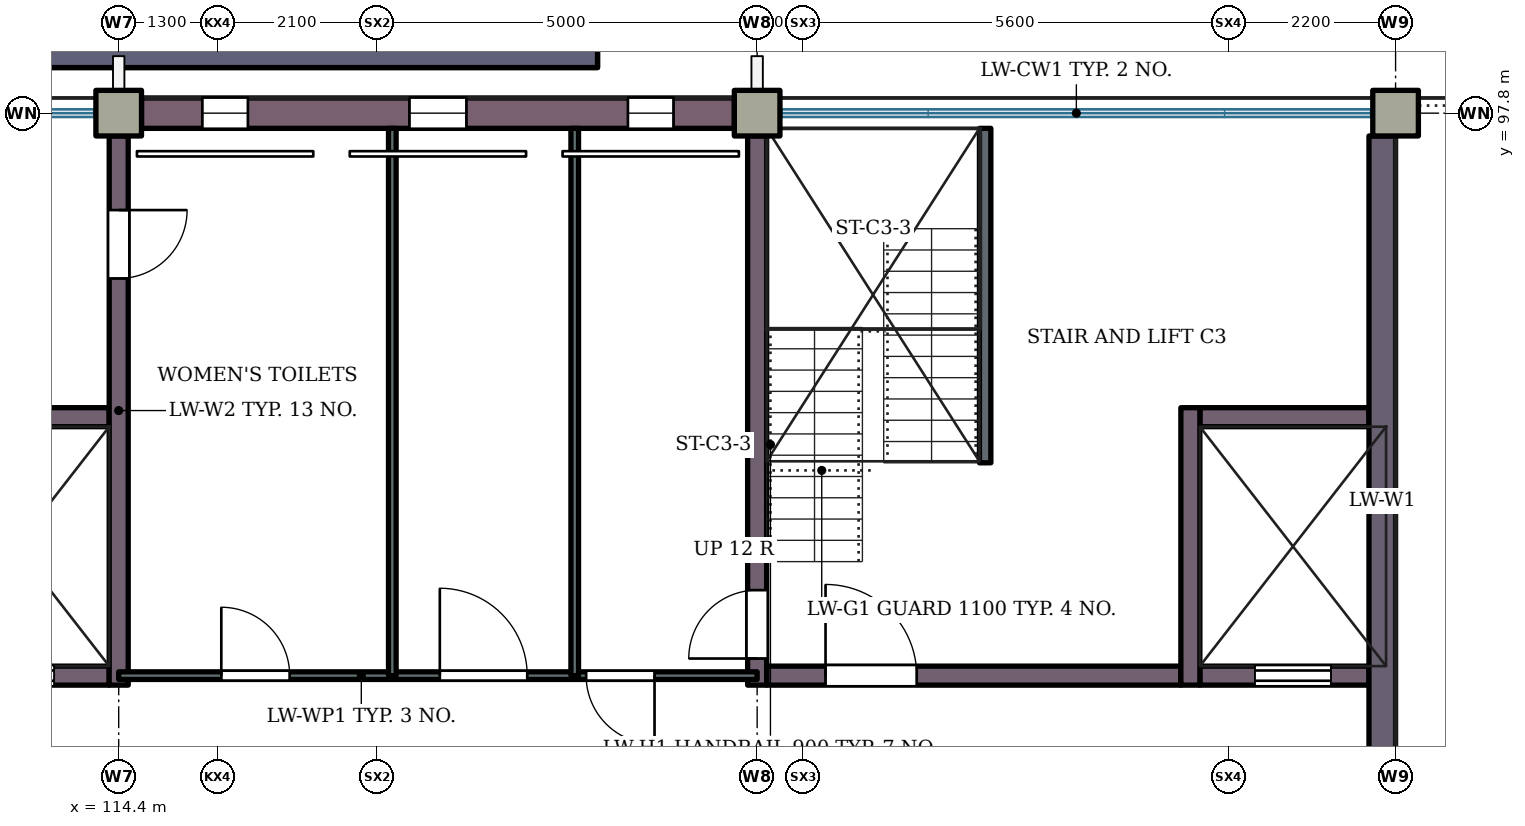
"""IFC4 building model, lengths in metres.
Left out: names, types, materials, properties, quantities, classifications, styles, units other than length and angle.
Written with IfcOpenShell. Run it as: python <this file> out.ifc"""

import sys

from ifc_helpers import new_model, si_unit, direction, frame, frame_2d, origin, origin_2d, place, context, subcontext, project, spatial, rectangle, extrude, element, fill, save


model = new_model("IFC4")
c1 = context("Model", 3, precision=1e-05, world=origin(), true_north=direction((0.0, 1.0)))
c2 = subcontext(c1, "Body", "Model", "MODEL_VIEW")
j1 = project(units=[si_unit("LENGTHUNIT", "METRE"), si_unit("PLANEANGLEUNIT", "RADIAN")], contexts=[c1])
p1 = place(None, origin())
s1 = spatial("IfcSite", under=j1, at=p1, CompositionType="ELEMENT")
p2 = place(p1, origin())
s2 = spatial("IfcBuilding", under=s1, at=p2, CompositionType="ELEMENT")
p3 = place(p2, frame((0.0, 0.0, 12.6)))
s3 = spatial("IfcBuildingStorey", under=s2, at=p3, CompositionType="ELEMENT", Elevation=12.6)
for number, where, z_axis, x_axis in (
    (1, (114.4, 97.8, 0.0), (0.0, 0.0, 1.0), (1.0, 0.0, 0.0)),
    (2, (122.8, 97.8, 0.0), (0.0, 0.0, 1.0), (1.0, 0.0, 0.0)),
    (3, (131.2, 97.8, 0.0), (0.0, 0.0, 1.0), (1.0, 0.0, 0.0)),
):
    element("IfcColumn", number, at=place(p3, frame(where, z_axis=z_axis, x_axis=x_axis)), inside=s3, PredefinedType="COLUMN", context=c2, shape_type="SweptSolid", body=[
        extrude(rectangle(XDim=0.6, YDim=0.6, at=origin_2d()), origin(), (0.0, 0.0, 1.0), 4.2),
    ])
p4 = place(p3, frame((111.825, 90.4, 0.0), z_axis=(0.0, 0.0, 1.0), x_axis=(1.0, 0.0, 0.0)))
e4 = element("IfcWall", 4, at=p4, inside=s3, PredefinedType="SHEAR", context=c2, shape_type="SweptSolid", body=[
    extrude(rectangle(XDim=2.45, YDim=0.25, at=frame_2d((1.225, 0.0))), origin(), (0.0, 0.0, 1.0), 4.2),
])
p5 = place(p4, frame((0.725, 0.0, 0.0)))
e5 = element("IfcOpeningElement", 5, at=p5, cuts=e4, PredefinedType="OPENING", context=c2, shape_type="SweptSolid", body=[
    extrude(rectangle(XDim=1.0, YDim=2.1, at=frame_2d((0.5, 1.05))), frame((0.0, 0.135, 0.0), z_axis=(0.0, -1.0, 0.0), x_axis=(1.0, 0.0, 0.0)), (0.0, 0.0, 1.0), 0.27),
])
p6 = place(p3, frame((122.925, 90.4, 0.0), z_axis=(0.0, 0.0, 1.0), x_axis=(1.0, 0.0, 0.0)))
e6 = element("IfcWall", 6, at=p6, inside=s3, PredefinedType="SHEAR", context=c2, shape_type="SweptSolid", body=[
    extrude(rectangle(XDim=5.45, YDim=0.25, at=frame_2d((2.725, 0.0))), origin(), (0.0, 0.0, 1.0), 4.2),
])
p7 = place(p6, frame((0.775, 0.0, 0.0)))
e7 = element("IfcOpeningElement", 7, at=p7, cuts=e6, PredefinedType="OPENING", context=c2, shape_type="SweptSolid", body=[
    extrude(rectangle(XDim=1.2, YDim=2.1, at=frame_2d((0.6, 1.05))), frame((0.0, 0.135, 0.0), z_axis=(0.0, -1.0, 0.0), x_axis=(1.0, 0.0, 0.0)), (0.0, 0.0, 1.0), 0.27),
])
p8 = place(p3, frame((128.625, 90.4, 0.0), z_axis=(0.0, 0.0, 1.0), x_axis=(1.0, 0.0, 0.0)))
e8 = element("IfcWall", 8, at=p8, inside=s3, PredefinedType="SHEAR", context=c2, shape_type="SweptSolid", body=[
    extrude(rectangle(XDim=2.225, YDim=0.25, at=frame_2d((1.113, 0.0))), origin(), (0.0, 0.0, 1.0), 4.2),
])
p9 = place(p8, frame((0.725, 0.0, 0.0)))
e9 = element("IfcOpeningElement", 9, at=p9, cuts=e8, PredefinedType="OPENING", context=c2, shape_type="SweptSolid", body=[
    extrude(rectangle(XDim=1.0, YDim=2.1, at=frame_2d((0.5, 1.05))), frame((0.0, 0.135, 0.0), z_axis=(0.0, -1.0, 0.0), x_axis=(1.0, 0.0, 0.0)), (0.0, 0.0, 1.0), 0.27),
])
p10 = place(p3, frame((111.825, 93.8, 0.0), z_axis=(0.0, 0.0, 1.0), x_axis=(1.0, 0.0, 0.0)))
e10 = element("IfcWall", 10, at=p10, inside=s3, PredefinedType="SHEAR", context=c2, shape_type="SweptSolid", body=[
    extrude(rectangle(XDim=2.45, YDim=0.25, at=frame_2d((1.225, 0.0))), origin(), (0.0, 0.0, 1.0), 4.2),
])
p11 = place(p3, frame((128.625, 93.8, 0.0), z_axis=(0.0, 0.0, 1.0), x_axis=(1.0, 0.0, 0.0)))
e11 = element("IfcWall", 11, at=p11, inside=s3, PredefinedType="SHEAR", context=c2, shape_type="SweptSolid", body=[
    extrude(rectangle(XDim=2.225, YDim=0.25, at=frame_2d((1.113, 0.0))), origin(), (0.0, 0.0, 1.0), 4.2),
])
p12 = place(p3, frame((114.4, 90.275, 0.0), z_axis=(0.0, 0.0, 1.0), x_axis=(0.0, 1.0, 0.0)))
e12 = element("IfcWall", 12, at=p12, inside=s3, PredefinedType="SHEAR", context=c2, shape_type="SweptSolid", body=[
    extrude(rectangle(XDim=7.225, YDim=0.25, at=frame_2d((3.613, 0.0))), origin(), (0.0, 0.0, 1.0), 4.2),
])
p13 = place(p12, frame((5.35, 0.0, 0.0)))
e13 = element("IfcOpeningElement", 13, at=p13, cuts=e12, PredefinedType="OPENING", context=c2, shape_type="SweptSolid", body=[
    extrude(rectangle(XDim=0.9, YDim=2.1, at=frame_2d((0.45, 1.05))), frame((0.0, 0.135, 0.0), z_axis=(0.0, -1.0, 0.0), x_axis=(1.0, 0.0, 0.0)), (0.0, 0.0, 1.0), 0.27),
])
p14 = place(p3, frame((122.8, 90.275, 0.0), z_axis=(0.0, 0.0, 1.0), x_axis=(0.0, 1.0, 0.0)))
e14 = element("IfcWall", 14, at=p14, inside=s3, PredefinedType="SHEAR", context=c2, shape_type="SweptSolid", body=[
    extrude(rectangle(XDim=7.225, YDim=0.25, at=frame_2d((3.613, 0.0))), origin(), (0.0, 0.0, 1.0), 4.2),
])
p15 = place(p14, frame((0.35, 0.0, 0.0)))
e15 = element("IfcOpeningElement", 15, at=p15, cuts=e14, PredefinedType="OPENING", context=c2, shape_type="SweptSolid", body=[
    extrude(rectangle(XDim=0.9, YDim=2.1, at=frame_2d((0.45, 1.05))), frame((0.0, 0.135, 0.0), z_axis=(0.0, -1.0, 0.0), x_axis=(1.0, 0.0, 0.0)), (0.0, 0.0, 1.0), 0.27),
])
p16 = place(p3, frame((128.5, 90.275, 0.0), z_axis=(0.0, 0.0, 1.0), x_axis=(0.0, 1.0, 0.0)))
e16 = element("IfcWall", 16, at=p16, inside=s3, PredefinedType="SHEAR", context=c2, shape_type="SweptSolid", body=[
    extrude(rectangle(XDim=3.65, YDim=0.25, at=frame_2d((1.825, 0.0))), origin(), (0.0, 0.0, 1.0), 4.2),
])
p17 = place(p3, frame((131.025, 97.5, 0.0), z_axis=(0.0, 0.0, 1.0), x_axis=(0.0, -1.0, 0.0)))
e17 = element("IfcWall", 17, at=p17, inside=s3, PredefinedType="SHEAR", context=c2, shape_type="SweptSolid", body=[
    extrude(rectangle(XDim=9.6, YDim=0.35, at=frame_2d((4.8, 0.0))), origin(), (0.0, 0.0, 1.0), 4.2),
])
p18 = place(p3, frame((114.7, 97.8, 0.0), z_axis=(0.0, 0.0, 1.0), x_axis=(1.0, 0.0, 0.0)))
e18 = element("IfcWall", 18, at=p18, inside=s3, PredefinedType="SOLIDWALL", context=c2, shape_type="SweptSolid", body=[
    extrude(rectangle(XDim=7.8, YDim=0.4, at=frame_2d((3.9, 0.0))), origin(), (0.0, 0.0, 1.0), 3.32),
])
p19 = place(p18, frame((0.8, 0.0, 2.1)))
e19 = element("IfcOpeningElement", 19, at=p19, cuts=e18, PredefinedType="OPENING", context=c2, shape_type="SweptSolid", body=[
    extrude(rectangle(XDim=0.6, YDim=0.9, at=frame_2d((0.3, 0.45))), frame((0.0, 0.21, 0.0), z_axis=(0.0, -1.0, 0.0), x_axis=(1.0, 0.0, 0.0)), (0.0, 0.0, 1.0), 0.42),
])
p20 = place(p18, frame((3.525, 0.0, 2.1)))
e20 = element("IfcOpeningElement", 20, at=p20, cuts=e18, PredefinedType="OPENING", context=c2, shape_type="SweptSolid", body=[
    extrude(rectangle(XDim=0.75, YDim=0.9, at=frame_2d((0.375, 0.45))), frame((0.0, 0.21, 0.0), z_axis=(0.0, -1.0, 0.0), x_axis=(1.0, 0.0, 0.0)), (0.0, 0.0, 1.0), 0.42),
])
p21 = place(p18, frame((6.4, 0.0, 2.1)))
e21 = element("IfcOpeningElement", 21, at=p21, cuts=e18, PredefinedType="OPENING", context=c2, shape_type="SweptSolid", body=[
    extrude(rectangle(XDim=0.6, YDim=0.9, at=frame_2d((0.3, 0.45))), frame((0.0, 0.21, 0.0), z_axis=(0.0, -1.0, 0.0), x_axis=(1.0, 0.0, 0.0)), (0.0, 0.0, 1.0), 0.42),
])
p22 = place(p3, frame((108.1, 98.9, 0.0), z_axis=(0.0, 0.0, 1.0), x_axis=(1.0, 0.0, 0.0)))
e22 = element("IfcWall", 22, at=p22, inside=s3, PredefinedType="STANDARD", context=c2, shape_type="SweptSolid", body=[
    extrude(rectangle(XDim=12.6, YDim=1.0, at=frame_2d((6.3, 0.0))), origin(), (0.0, 0.0, 1.0), 2.6),
])
p23 = place(p3, frame((108.1, 98.9, 2.6), z_axis=(0.0, 0.0, 1.0), x_axis=(1.0, 0.0, 0.0)))
e23 = element("IfcWall", 23, at=p23, inside=s3, PredefinedType="STANDARD", context=c2, shape_type="SweptSolid", body=[
    extrude(rectangle(XDim=12.6, YDim=1.0, at=frame_2d((6.3, 0.0))), origin(), (0.0, 0.0, 1.0), 1.6),
])
p24 = place(p3, frame((114.4, 90.4, 0.0), z_axis=(0.0, 0.0, 1.0), x_axis=(1.0, 0.0, 0.0)))
e24 = element("IfcWall", 24, at=p24, inside=s3, PredefinedType="PARTITIONING", context=c2, shape_type="SweptSolid", body=[
    extrude(rectangle(XDim=8.4, YDim=0.1, at=frame_2d((4.2, 0.0))), origin(), (0.0, 0.0, 1.0), 3.92),
])
p25 = place(p24, frame((1.35, 0.0, 0.0)))
e25 = element("IfcOpeningElement", 25, at=p25, cuts=e24, PredefinedType="OPENING", context=c2, shape_type="SweptSolid", body=[
    extrude(rectangle(XDim=0.9, YDim=2.1, at=frame_2d((0.45, 1.05))), frame((0.0, 0.06, 0.0), z_axis=(0.0, -1.0, 0.0), x_axis=(1.0, 0.0, 0.0)), (0.0, 0.0, 1.0), 0.12),
])
p26 = place(p24, frame((4.225, 0.0, 0.0)))
e26 = element("IfcOpeningElement", 26, at=p26, cuts=e24, PredefinedType="OPENING", context=c2, shape_type="SweptSolid", body=[
    extrude(rectangle(XDim=1.15, YDim=2.1, at=frame_2d((0.575, 1.05))), frame((0.0, 0.06, 0.0), z_axis=(0.0, -1.0, 0.0), x_axis=(1.0, 0.0, 0.0)), (0.0, 0.0, 1.0), 0.12),
])
p27 = place(p24, frame((6.15, 0.0, 0.0)))
e27 = element("IfcOpeningElement", 27, at=p27, cuts=e24, PredefinedType="OPENING", context=c2, shape_type="SweptSolid", body=[
    extrude(rectangle(XDim=0.9, YDim=2.1, at=frame_2d((0.45, 1.05))), frame((0.0, 0.06, 0.0), z_axis=(0.0, -1.0, 0.0), x_axis=(1.0, 0.0, 0.0)), (0.0, 0.0, 1.0), 0.12),
])
for number, where, z_axis, x_axis in (
    (28, (118.0, 90.4, 0.0), (0.0, 0.0, 1.0), (0.0, 1.0, 0.0)),
    (29, (120.4, 90.4, 0.0), (0.0, 0.0, 1.0), (0.0, 1.0, 0.0)),
):
    element("IfcWall", number, at=place(p3, frame(where, z_axis=z_axis, x_axis=x_axis)), inside=s3, PredefinedType="PARTITIONING", context=c2, shape_type="SweptSolid", body=[
        extrude(rectangle(XDim=7.2, YDim=0.1, at=frame_2d((3.6, 0.0))), origin(), (0.0, 0.0, 1.0), 3.92),
    ])
p28 = place(p3, frame((125.8, 93.2, 0.0), z_axis=(0.0, 0.0, 1.0), x_axis=(0.0, 1.0, 0.0)))
e30 = element("IfcWall", 30, at=p28, inside=s3, PredefinedType="PARTITIONING", context=c2, shape_type="SweptSolid", body=[
    extrude(rectangle(XDim=4.4, YDim=0.15, at=frame_2d((2.2, 0.0))), origin(), (0.0, 0.0, 1.0), 3.92),
])
p29 = place(p19, origin())
e31 = element("IfcWindow", 31, at=p29, inside=s3, PartitioningType="SINGLE_PANEL", PredefinedType="WINDOW", context=c2, shape_type="SweptSolid", body=[
    extrude(rectangle(XDim=0.6, YDim=0.9, at=frame_2d((0.3, 0.45))), frame((0.0, 0.03, 0.0), z_axis=(0.0, -1.0, 0.0), x_axis=(1.0, 0.0, 0.0)), (0.0, 0.0, 1.0), 0.06),
])
fill(e19, e31)
p30 = place(p20, origin())
e32 = element("IfcWindow", 32, at=p30, inside=s3, PartitioningType="SINGLE_PANEL", PredefinedType="WINDOW", context=c2, shape_type="SweptSolid", body=[
    extrude(rectangle(XDim=0.75, YDim=0.9, at=frame_2d((0.375, 0.45))), frame((0.0, 0.03, 0.0), z_axis=(0.0, -1.0, 0.0), x_axis=(1.0, 0.0, 0.0)), (0.0, 0.0, 1.0), 0.06),
])
fill(e20, e32)
p31 = place(p21, origin())
e33 = element("IfcWindow", 33, at=p31, inside=s3, PartitioningType="SINGLE_PANEL", PredefinedType="WINDOW", context=c2, shape_type="SweptSolid", body=[
    extrude(rectangle(XDim=0.6, YDim=0.9, at=frame_2d((0.3, 0.45))), frame((0.0, 0.03, 0.0), z_axis=(0.0, -1.0, 0.0), x_axis=(1.0, 0.0, 0.0)), (0.0, 0.0, 1.0), 0.06),
])
fill(e21, e33)
p32 = place(p25, origin())
e34 = element("IfcDoor", 34, at=p32, inside=s3, OperationType="SINGLE_SWING_LEFT", PredefinedType="DOOR", context=c2, shape_type="SweptSolid", body=[
    extrude(rectangle(XDim=0.9, YDim=2.1, at=frame_2d((0.45, 1.05))), frame((0.0, 0.025, 0.0), z_axis=(0.0, -1.0, 0.0), x_axis=(1.0, 0.0, 0.0)), (0.0, 0.0, 1.0), 0.05),
])
fill(e25, e34)
p33 = place(p13, origin())
e35 = element("IfcDoor", 35, at=p33, inside=s3, OperationType="SINGLE_SWING_RIGHT", PredefinedType="DOOR", context=c2, shape_type="SweptSolid", body=[
    extrude(rectangle(XDim=0.9, YDim=2.1, at=frame_2d((0.45, 1.05))), frame((0.0, 0.025, 0.0), z_axis=(0.0, -1.0, 0.0), x_axis=(1.0, 0.0, 0.0)), (0.0, 0.0, 1.0), 0.05),
])
fill(e13, e35)
p34 = place(p26, origin())
e36 = element("IfcDoor", 36, at=p34, inside=s3, OperationType="SINGLE_SWING_LEFT", PredefinedType="DOOR", context=c2, shape_type="SweptSolid", body=[
    extrude(rectangle(XDim=1.15, YDim=2.1, at=frame_2d((0.575, 1.05))), frame((0.0, 0.025, 0.0), z_axis=(0.0, -1.0, 0.0), x_axis=(1.0, 0.0, 0.0)), (0.0, 0.0, 1.0), 0.05),
])
fill(e26, e36)
p35 = place(p27, origin())
e37 = element("IfcDoor", 37, at=p35, inside=s3, OperationType="SINGLE_SWING_RIGHT", PredefinedType="DOOR", context=c2, shape_type="SweptSolid", body=[
    extrude(rectangle(XDim=0.9, YDim=2.1, at=frame_2d((0.45, 1.05))), frame((0.0, 0.025, 0.0), z_axis=(0.0, -1.0, 0.0), x_axis=(1.0, 0.0, 0.0)), (0.0, 0.0, 1.0), 0.05),
])
fill(e27, e37)
p36 = place(p15, origin())
e38 = element("IfcDoor", 38, at=p36, inside=s3, OperationType="SINGLE_SWING_LEFT", PredefinedType="DOOR", context=c2, shape_type="SweptSolid", body=[
    extrude(rectangle(XDim=0.9, YDim=2.1, at=frame_2d((0.45, 1.05))), frame((0.0, 0.025, 0.0), z_axis=(0.0, -1.0, 0.0), x_axis=(1.0, 0.0, 0.0)), (0.0, 0.0, 1.0), 0.05),
])
fill(e15, e38)
p37 = place(p5, origin())
e39 = element("IfcDoor", 39, at=p37, inside=s3, OperationType="SLIDING_TO_LEFT", PredefinedType="DOOR", context=c2, shape_type="SweptSolid", body=[
    extrude(rectangle(XDim=1.0, YDim=2.1, at=frame_2d((0.5, 1.05))), frame((0.0, 0.025, 0.0), z_axis=(0.0, -1.0, 0.0), x_axis=(1.0, 0.0, 0.0)), (0.0, 0.0, 1.0), 0.05),
])
fill(e5, e39)
p38 = place(p7, origin())
e40 = element("IfcDoor", 40, at=p38, inside=s3, OperationType="SINGLE_SWING_LEFT", PredefinedType="DOOR", context=c2, shape_type="SweptSolid", body=[
    extrude(rectangle(XDim=1.2, YDim=2.1, at=frame_2d((0.6, 1.05))), frame((0.0, 0.025, 0.0), z_axis=(0.0, -1.0, 0.0), x_axis=(1.0, 0.0, 0.0)), (0.0, 0.0, 1.0), 0.05),
])
fill(e7, e40)
p39 = place(p9, origin())
e41 = element("IfcDoor", 41, at=p39, inside=s3, OperationType="SLIDING_TO_LEFT", PredefinedType="DOOR", context=c2, shape_type="SweptSolid", body=[
    extrude(rectangle(XDim=1.0, YDim=2.1, at=frame_2d((0.5, 1.05))), frame((0.0, 0.025, 0.0), z_axis=(0.0, -1.0, 0.0), x_axis=(1.0, 0.0, 0.0)), (0.0, 0.0, 1.0), 0.05),
])
fill(e9, e41)
save(model, sys.argv[1])
